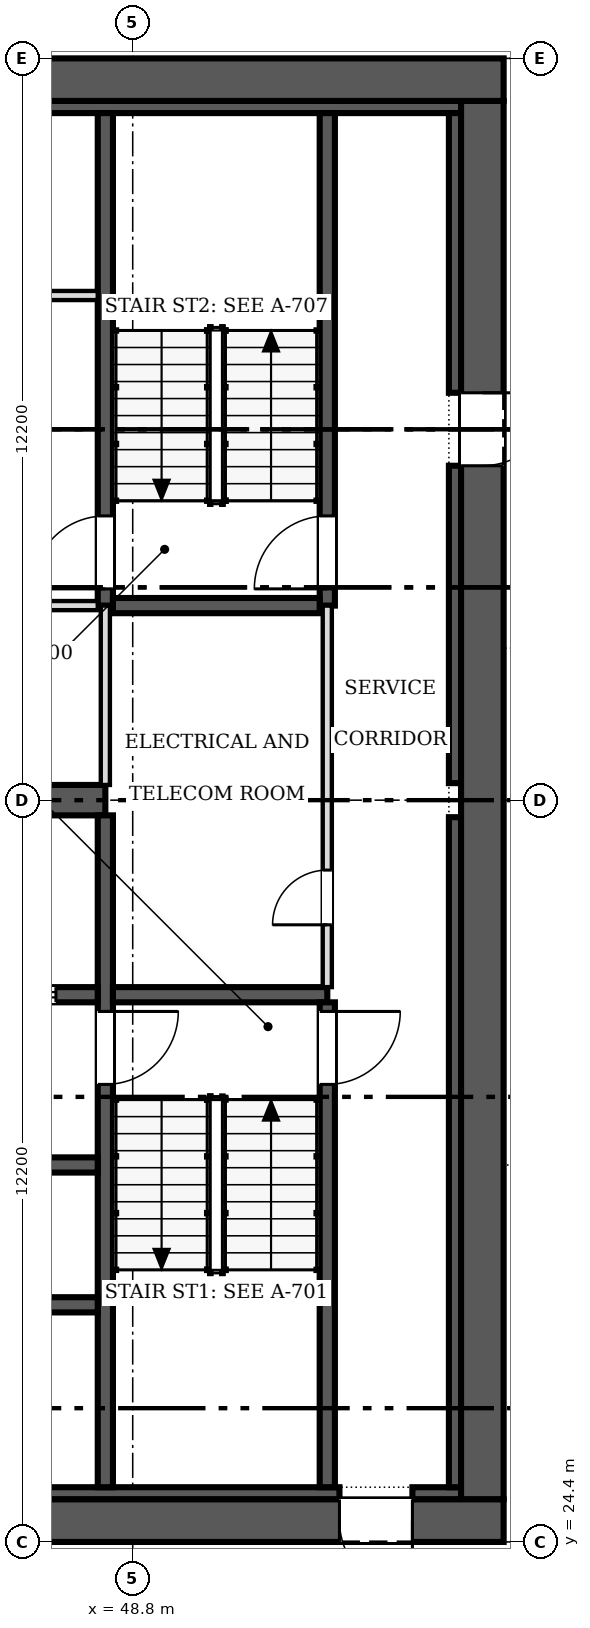
"""IFC4 building model, lengths in metres.
Left out: names, types, materials, properties, quantities, classifications, styles, units other than length and angle.
Written with IfcOpenShell. Run it as: python <this file> out.ifc"""

import sys

from ifc_helpers import new_model, si_unit, direction, frame, frame_2d, origin, place, context, subcontext, project, spatial, rectangle, extrude, source, transform, mapped, element, fill, save


model = new_model("IFC4")
c1 = context("Model", 3, precision=1e-05, world=origin(), true_north=direction((0.0, 1.0)))
c2 = subcontext(c1, "Body", "Model", "MODEL_VIEW")
j1 = project(units=[si_unit("LENGTHUNIT", "METRE"), si_unit("PLANEANGLEUNIT", "RADIAN")], contexts=[c1])
p1 = place(None, origin())
s1 = spatial("IfcSite", under=j1, at=p1, CompositionType="ELEMENT")
p2 = place(p1, origin())
s2 = spatial("IfcBuilding", under=s1, at=p2, CompositionType="ELEMENT")
p3 = place(p2, frame((0.0, 0.0, 143.0)))
s3 = spatial("IfcBuildingStorey", under=s2, at=p3, CompositionType="ELEMENT", Elevation=143.0)
p4 = place(p3, frame((54.9, 24.75, 0.0), z_axis=(0.0, 0.0, 1.0), x_axis=(-1.0, 0.0, 0.0)))
e1 = element("IfcWall", 1, at=p4, inside=s3, PredefinedType="SHEAR", context=c2, shape_type="SweptSolid", body=[
    extrude(rectangle(XDim=24.4, YDim=0.7, at=frame_2d((12.2, 0.0))), origin(), (0.0, 0.0, 1.0), 3.8),
])
m1 = source(origin(), c2, "Body", "SweptSolid", [
    extrude(rectangle(XDim=1.2, YDim=2.1, at=frame_2d((0.6, 1.05))), frame((0.0, 0.36, 0.0), z_axis=(0.0, -1.0, 0.0), x_axis=(1.0, 0.0, 0.0)), (0.0, 0.0, 1.0), 0.72),
])
p5 = place(p4, frame((1.5, 0.0, 0.0)))
e2 = element("IfcOpeningElement", 2, at=p5, cuts=e1, PredefinedType="OPENING", context=c2, shape_type="MappedRepresentation", body=[
    mapped(m1, transform((0.0, 0.0, 0.0), scale=1.0)),
])
p6 = place(p3, frame((30.5, 48.45, 0.0), z_axis=(0.0, 0.0, 1.0), x_axis=(1.0, 0.0, 0.0)))
e3 = element("IfcWall", 3, at=p6, inside=s3, PredefinedType="SHEAR", context=c2, shape_type="SweptSolid", body=[
    extrude(rectangle(XDim=24.4, YDim=0.7, at=frame_2d((12.2, 0.0))), origin(), (0.0, 0.0, 1.0), 3.8),
])
p7 = place(p3, frame((54.55, 48.1, 0.0), z_axis=(0.0, 0.0, 1.0), x_axis=(0.0, -1.0, 0.0)))
e4 = element("IfcWall", 4, at=p7, inside=s3, PredefinedType="SHEAR", context=c2, shape_type="SweptSolid", body=[
    extrude(rectangle(XDim=23.0, YDim=0.7, at=frame_2d((11.5, 0.0))), origin(), (0.0, 0.0, 1.0), 3.8),
])
p8 = place(p7, frame((4.8, 0.0, 0.0)))
e5 = element("IfcOpeningElement", 5, at=p8, cuts=e4, PredefinedType="OPENING", context=c2, shape_type="MappedRepresentation", body=[
    mapped(m1, transform((0.0, 0.0, 0.0), scale=1.0)),
])
p9 = place(p3, frame((31.2, 25.2, 0.0), z_axis=(0.0, 0.0, 1.0), x_axis=(1.0, 0.0, 0.0)))
e6 = element("IfcWall", 6, at=p9, inside=s3, PredefinedType="SOLIDWALL", context=c2, shape_type="SweptSolid", body=[
    extrude(rectangle(XDim=21.0, YDim=0.2, at=frame_2d((10.5, 0.0))), origin(), (0.0, 0.0, 1.0), 3.8),
])
p10 = place(p3, frame((53.4, 25.2, 0.0), z_axis=(0.0, 0.0, 1.0), x_axis=(1.0, 0.0, 0.0)))
e7 = element("IfcWall", 7, at=p10, inside=s3, PredefinedType="SOLIDWALL", context=c2, shape_type="SweptSolid", body=[
    extrude(rectangle(XDim=0.8, YDim=0.2, at=frame_2d((0.4, 0.0))), origin(), (0.0, 0.0, 1.0), 3.8),
])
p11 = place(p3, frame((31.2, 48.0, 0.0), z_axis=(0.0, 0.0, 1.0), x_axis=(1.0, 0.0, 0.0)))
e8 = element("IfcWall", 8, at=p11, inside=s3, PredefinedType="SOLIDWALL", context=c2, shape_type="SweptSolid", body=[
    extrude(rectangle(XDim=23.0, YDim=0.2, at=frame_2d((11.5, 0.0))), origin(), (0.0, 0.0, 1.0), 3.8),
])
p12 = place(p3, frame((54.1, 25.3, 0.0), z_axis=(0.0, 0.0, 1.0), x_axis=(0.0, 1.0, 0.0)))
e9 = element("IfcWall", 9, at=p12, inside=s3, PredefinedType="SOLIDWALL", context=c2, shape_type="SweptSolid", body=[
    extrude(rectangle(XDim=11.02, YDim=0.2, at=frame_2d((5.51, 0.0))), origin(), (0.0, 0.0, 1.0), 3.8),
])
p13 = place(p3, frame((54.1, 36.88, 0.0), z_axis=(0.0, 0.0, 1.0), x_axis=(0.0, 1.0, 0.0)))
e10 = element("IfcWall", 10, at=p13, inside=s3, PredefinedType="SOLIDWALL", context=c2, shape_type="SweptSolid", body=[
    extrude(rectangle(XDim=5.22, YDim=0.2, at=frame_2d((2.61, 0.0))), origin(), (0.0, 0.0, 1.0), 3.8),
])
p14 = place(p3, frame((54.1, 43.3, 0.0), z_axis=(0.0, 0.0, 1.0), x_axis=(0.0, 1.0, 0.0)))
e11 = element("IfcWall", 11, at=p14, inside=s3, PredefinedType="SOLIDWALL", context=c2, shape_type="SweptSolid", body=[
    extrude(rectangle(XDim=4.6, YDim=0.2, at=frame_2d((2.3, 0.0))), origin(), (0.0, 0.0, 1.0), 3.8),
])
p15 = place(p3, frame((31.4, 36.6, 0.0), z_axis=(0.0, 0.0, 1.0), x_axis=(1.0, 0.0, 0.0)))
e12 = element("IfcWall", 12, at=p15, inside=s3, PredefinedType="SHEAR", context=c2, shape_type="SweptSolid", body=[
    extrude(rectangle(XDim=16.95, YDim=0.5, at=frame_2d((8.475, 0.0))), origin(), (0.0, 0.0, 1.0), 3.8),
])
p16 = place(p3, frame((48.35, 36.35, 0.0), z_axis=(0.0, 0.0, 1.0), x_axis=(0.0, -1.0, 0.0)))
e13 = element("IfcWall", 13, at=p16, inside=s3, PredefinedType="SOLIDWALL", context=c2, shape_type="SweptSolid", body=[
    extrude(rectangle(XDim=11.05, YDim=0.25, at=frame_2d((5.525, 0.0))), origin(), (0.0, 0.0, 1.0), 3.8),
])
m2 = source(origin(), c2, "Body", "SweptSolid", [
    extrude(rectangle(XDim=1.2, YDim=2.1, at=frame_2d((0.6, 1.05))), frame((0.0, 0.135, 0.0), z_axis=(0.0, -1.0, 0.0), x_axis=(1.0, 0.0, 0.0)), (0.0, 0.0, 1.0), 0.27),
])
p17 = place(p16, frame((3.225, 0.0, 0.0)))
e14 = element("IfcOpeningElement", 14, at=p17, cuts=e13, PredefinedType="OPENING", context=c2, shape_type="MappedRepresentation", body=[
    mapped(m2, transform((0.0, 0.0, 0.0), scale=1.0)),
])
p18 = place(p3, frame((48.225, 33.4, 0.0), z_axis=(0.0, 0.0, 1.0), x_axis=(-1.0, 0.0, 0.0)))
e15 = element("IfcWall", 15, at=p18, inside=s3, PredefinedType="SOLIDWALL", context=c2, shape_type="SweptSolid", body=[
    extrude(rectangle(XDim=5.275, YDim=0.25, at=frame_2d((2.638, 0.0))), origin(), (0.0, 0.0, 1.0), 3.8),
])
p19 = place(p18, frame((3.512, 0.0, 0.0)))
e16 = element("IfcOpeningElement", 16, at=p19, cuts=e15, PredefinedType="OPENING", context=c2, shape_type="MappedRepresentation", body=[
    mapped(m2, transform((0.0, 0.0, 0.0), scale=1.0)),
])
p20 = place(p18, frame((0.688, 0.0, 0.0)))
e17 = element("IfcOpeningElement", 17, at=p20, cuts=e15, PredefinedType="OPENING", context=c2, shape_type="MappedRepresentation", body=[
    mapped(m2, transform((0.0, 0.0, 0.0), scale=1.0)),
])
p21 = place(p3, frame((48.475, 33.4, 0.0), z_axis=(0.0, 0.0, 1.0), x_axis=(1.0, 0.0, 0.0)))
e18 = element("IfcWall", 18, at=p21, inside=s3, PredefinedType="SOLIDWALL", context=c2, shape_type="SweptSolid", body=[
    extrude(rectangle(XDim=3.525, YDim=0.25, at=frame_2d((1.762, 0.0))), origin(), (0.0, 0.0, 1.0), 3.8),
])
p22 = place(p3, frame((48.35, 47.9, 0.0), z_axis=(0.0, 0.0, 1.0), x_axis=(0.0, -1.0, 0.0)))
e19 = element("IfcWall", 19, at=p22, inside=s3, PredefinedType="SOLIDWALL", context=c2, shape_type="SweptSolid", body=[
    extrude(rectangle(XDim=8.1, YDim=0.25, at=frame_2d((4.05, 0.0))), origin(), (0.0, 0.0, 1.0), 3.8),
])
p23 = place(p22, frame((6.625, 0.0, 0.0)))
e20 = element("IfcOpeningElement", 20, at=p23, cuts=e19, PredefinedType="OPENING", context=c2, shape_type="MappedRepresentation", body=[
    mapped(m2, transform((0.0, 0.0, 0.0), scale=1.0)),
])
p24 = place(p3, frame((52.0, 25.3, 0.0), z_axis=(0.0, 0.0, 1.0), x_axis=(0.0, 1.0, 0.0)))
e21 = element("IfcWall", 21, at=p24, inside=s3, PredefinedType="SOLIDWALL", context=c2, shape_type="SweptSolid", body=[
    extrude(rectangle(XDim=7.975, YDim=0.25, at=frame_2d((3.987, 0.0))), origin(), (0.0, 0.0, 1.0), 3.8),
])
p25 = place(p24, frame((6.625, 0.0, 0.0)))
e22 = element("IfcOpeningElement", 22, at=p25, cuts=e21, PredefinedType="OPENING", context=c2, shape_type="MappedRepresentation", body=[
    mapped(m2, transform((0.0, 0.0, 0.0), scale=1.0)),
])
p26 = place(p3, frame((52.0, 39.8, 0.0), z_axis=(0.0, 0.0, 1.0), x_axis=(0.0, 1.0, 0.0)))
e23 = element("IfcWall", 23, at=p26, inside=s3, PredefinedType="SOLIDWALL", context=c2, shape_type="SweptSolid", body=[
    extrude(rectangle(XDim=8.1, YDim=0.25, at=frame_2d((4.05, 0.0))), origin(), (0.0, 0.0, 1.0), 3.8),
])
p27 = place(p26, frame((0.275, 0.0, 0.0)))
e24 = element("IfcOpeningElement", 24, at=p27, cuts=e23, PredefinedType="OPENING", context=c2, shape_type="MappedRepresentation", body=[
    mapped(m2, transform((0.0, 0.0, 0.0), scale=1.0)),
])
for number, where, z_axis, x_axis in (
    (25, (42.95, 28.3, 0.0), (0.0, 0.0, 1.0), (1.0, 0.0, 0.0)),
    (26, (42.95, 30.6, 0.0), (0.0, 0.0, 1.0), (1.0, 0.0, 0.0)),
):
    element("IfcWall", number, at=place(p3, frame(where, z_axis=z_axis, x_axis=x_axis)), inside=s3, PredefinedType="SOLIDWALL", context=c2, shape_type="SweptSolid", body=[
        extrude(rectangle(XDim=5.275, YDim=0.25, at=frame_2d((2.638, 0.0))), origin(), (0.0, 0.0, 1.0), 3.8),
    ])
p28 = place(p3, frame((48.475, 39.8, 0.0), z_axis=(0.0, 0.0, 1.0), x_axis=(1.0, 0.0, 0.0)))
e27 = element("IfcWall", 27, at=p28, inside=s3, PredefinedType="SOLIDWALL", context=c2, shape_type="SweptSolid", body=[
    extrude(rectangle(XDim=3.4, YDim=0.25, at=frame_2d((1.7, 0.0))), origin(), (0.0, 0.0, 1.0), 3.8),
])
p29 = place(p3, frame((52.0, 33.525, 0.0), z_axis=(0.0, 0.0, 1.0), x_axis=(0.0, 1.0, 0.0)))
e28 = element("IfcWall", 28, at=p29, inside=s3, PredefinedType="PARTITIONING", context=c2, shape_type="SweptSolid", body=[
    extrude(rectangle(XDim=6.275, YDim=0.15, at=frame_2d((3.138, 0.0))), origin(), (0.0, 0.0, 1.0), 3.6),
])
m3 = source(origin(), c2, "Body", "SweptSolid", [
    extrude(rectangle(XDim=0.9, YDim=2.1, at=frame_2d((0.45, 1.05))), frame((0.0, 0.085, 0.0), z_axis=(0.0, -1.0, 0.0), x_axis=(1.0, 0.0, 0.0)), (0.0, 0.0, 1.0), 0.17),
])
p30 = place(p29, frame((1.025, 0.0, 0.0)))
e29 = element("IfcOpeningElement", 29, at=p30, cuts=e28, PredefinedType="OPENING", context=c2, shape_type="MappedRepresentation", body=[
    mapped(m3, transform((0.0, 0.0, 0.0), scale=1.0)),
])
p31 = place(p3, frame((48.225, 39.8, 0.0), z_axis=(0.0, 0.0, 1.0), x_axis=(-1.0, 0.0, 0.0)))
e30 = element("IfcWall", 30, at=p31, inside=s3, PredefinedType="PARTITIONING", context=c2, shape_type="SweptSolid", body=[
    extrude(rectangle(XDim=5.275, YDim=0.15, at=frame_2d((2.638, 0.0))), origin(), (0.0, 0.0, 1.0), 3.6),
])
p32 = place(p31, frame((2.25, 0.0, 0.0)))
e31 = element("IfcOpeningElement", 31, at=p32, cuts=e30, PredefinedType="OPENING", context=c2, shape_type="MappedRepresentation", body=[
    mapped(m3, transform((0.0, 0.0, 0.0), scale=1.0)),
])
p33 = place(p3, frame((48.35, 36.85, 0.0), z_axis=(0.0, 0.0, 1.0), x_axis=(0.0, 1.0, 0.0)))
e32 = element("IfcWall", 32, at=p33, inside=s3, PredefinedType="PARTITIONING", context=c2, shape_type="SweptSolid", body=[
    extrude(rectangle(XDim=2.95, YDim=0.15, at=frame_2d((1.475, 0.0))), origin(), (0.0, 0.0, 1.0), 3.6),
])
p34 = place(p3, frame((45.6, 44.9, 0.0), z_axis=(0.0, 0.0, 1.0), x_axis=(1.0, 0.0, 0.0)))
e33 = element("IfcWall", 33, at=p34, inside=s3, PredefinedType="PARTITIONING", context=c2, shape_type="SweptSolid", body=[
    extrude(rectangle(XDim=2.625, YDim=0.15, at=frame_2d((1.312, 0.0))), origin(), (0.0, 0.0, 1.0), 3.6),
])
p35 = place(p34, frame((0.85, 0.0, 0.0)))
e34 = element("IfcOpeningElement", 34, at=p35, cuts=e33, PredefinedType="OPENING", context=c2, shape_type="MappedRepresentation", body=[
    mapped(m3, transform((0.0, 0.0, 0.0), scale=1.0)),
])
m4 = source(origin(), c2, "Body", "SweptSolid", [
    extrude(rectangle(XDim=1.2, YDim=2.1, at=frame_2d((0.6, 1.05))), frame((0.0, 0.025, 0.0), z_axis=(0.0, -1.0, 0.0), x_axis=(1.0, 0.0, 0.0)), (0.0, 0.0, 1.0), 0.05),
])
p36 = place(p5, origin())
e35 = element("IfcDoor", 35, at=p36, inside=s3, OperationType="SINGLE_SWING_LEFT", PredefinedType="DOOR", context=c2, shape_type="MappedRepresentation", body=[
    mapped(m4, transform((0.0, 0.0, 0.0), scale=1.0)),
])
fill(e2, e35)
p37 = place(p8, origin())
e36 = element("IfcDoor", 36, at=p37, inside=s3, OperationType="SINGLE_SWING_LEFT", PredefinedType="DOOR", context=c2, shape_type="MappedRepresentation", body=[
    mapped(m4, transform((0.0, 0.0, 0.0), scale=1.0)),
])
fill(e5, e36)
p38 = place(p17, origin())
e37 = element("IfcDoor", 37, at=p38, inside=s3, OperationType="SINGLE_SWING_LEFT", PredefinedType="DOOR", context=c2, shape_type="MappedRepresentation", body=[
    mapped(m4, transform((0.0, 0.0, 0.0), scale=1.0)),
])
fill(e14, e37)
p39 = place(p20, origin())
e38 = element("IfcDoor", 38, at=p39, inside=s3, OperationType="DOUBLE_DOOR_SLIDING", PredefinedType="DOOR", context=c2, shape_type="MappedRepresentation", body=[
    mapped(m4, transform((0.0, 0.0, 0.0), scale=1.0)),
])
fill(e17, e38)
p40 = place(p23, origin())
e39 = element("IfcDoor", 39, at=p40, inside=s3, OperationType="SINGLE_SWING_RIGHT", PredefinedType="DOOR", context=c2, shape_type="MappedRepresentation", body=[
    mapped(m4, transform((0.0, 0.0, 0.0), scale=1.0)),
])
fill(e20, e39)
p41 = place(p25, origin())
e40 = element("IfcDoor", 40, at=p41, inside=s3, OperationType="SINGLE_SWING_RIGHT", PredefinedType="DOOR", context=c2, shape_type="MappedRepresentation", body=[
    mapped(m4, transform((0.0, 0.0, 0.0), scale=1.0)),
])
fill(e22, e40)
p42 = place(p27, origin())
e41 = element("IfcDoor", 41, at=p42, inside=s3, OperationType="SINGLE_SWING_LEFT", PredefinedType="DOOR", context=c2, shape_type="MappedRepresentation", body=[
    mapped(m4, transform((0.0, 0.0, 0.0), scale=1.0)),
])
fill(e24, e41)
m5 = source(origin(), c2, "Body", "SweptSolid", [
    extrude(rectangle(XDim=0.9, YDim=2.1, at=frame_2d((0.45, 1.05))), frame((0.0, 0.025, 0.0), z_axis=(0.0, -1.0, 0.0), x_axis=(1.0, 0.0, 0.0)), (0.0, 0.0, 1.0), 0.05),
])
p43 = place(p30, origin())
e42 = element("IfcDoor", 42, at=p43, inside=s3, OperationType="SINGLE_SWING_LEFT", PredefinedType="DOOR", context=c2, shape_type="MappedRepresentation", body=[
    mapped(m5, transform((0.0, 0.0, 0.0), scale=1.0)),
])
fill(e29, e42)
save(model, sys.argv[1])
